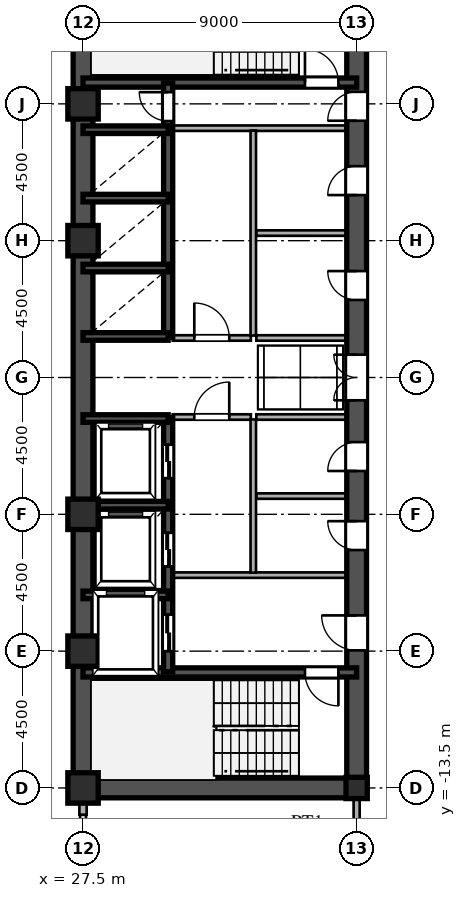
"""IFC4 building model, lengths in metres.
Left out: names, types, materials, properties, quantities, classifications, styles, units other than length and angle.
Written with IfcOpenShell. Run it as: python <this file> out.ifc"""

import sys

from ifc_helpers import new_model, si_unit, direction, frame, frame_2d, origin, origin_2d, place, context, subcontext, project, spatial, rectangle, hollow_rectangle, i_section, extrude, source, transform, mapped, element, fill, save


model = new_model("IFC4")
c1 = context("Model", 3, precision=1e-05, world=origin(), true_north=direction((0.0, 1.0)))
c2 = subcontext(c1, "Body", "Model", "MODEL_VIEW")
j1 = project(units=[si_unit("LENGTHUNIT", "METRE"), si_unit("PLANEANGLEUNIT", "RADIAN")], contexts=[c1])
p1 = place(None, origin())
s1 = spatial("IfcSite", under=j1, at=p1, CompositionType="ELEMENT")
p2 = place(p1, origin())
s2 = spatial("IfcBuilding", under=s1, at=p2, CompositionType="ELEMENT")
p3 = place(p2, frame((0.0, 0.0, 117.6)))
s3 = spatial("IfcBuildingStorey", under=s2, at=p3, CompositionType="ELEMENT", Elevation=117.6)
m1 = source(origin(), c2, "Body", "SweptSolid", [
    extrude(hollow_rectangle(XDim=1.0, YDim=1.0, WallThickness=0.042, at=origin_2d()), origin(), (0.0, 0.0, 1.0), 3.6),
])
for number, where, z_axis, x_axis in (
    (1, (27.5, -13.5, 0.0), (0.0, 0.0, 1.0), (1.0, 0.0, 0.0)),
    (2, (27.5, -9.0, 0.0), (0.0, 0.0, 1.0), (1.0, 0.0, 0.0)),
    (3, (27.5, -4.5, 0.0), (0.0, 0.0, 1.0), (1.0, 0.0, 0.0)),
    (4, (27.5, 4.5, 0.0), (0.0, 0.0, 1.0), (1.0, 0.0, 0.0)),
    (5, (27.5, 9.0, 0.0), (0.0, 0.0, 1.0), (1.0, 0.0, 0.0)),
):
    element("IfcColumn", number, at=place(p3, frame(where, z_axis=z_axis, x_axis=x_axis)), inside=s3, PredefinedType="COLUMN", context=c2, shape_type="MappedRepresentation", body=[
        mapped(m1, transform((0.0, 0.0, 0.0), scale=1.0)),
    ])
m2 = source(origin(), c2, "Body", "SweptSolid", [
    extrude(i_section(OverallWidth=0.7, OverallDepth=0.7, WebThickness=0.028, FlangeThickness=0.045, at=origin_2d()), origin(), (0.0, 0.0, 1.0), 3.6),
])
p4 = place(p3, frame((36.5, -13.5, 0.0), z_axis=(0.0, 0.0, 1.0), x_axis=(1.0, 0.0, 0.0)))
e6 = element("IfcColumn", 6, at=p4, inside=s3, PredefinedType="COLUMN", context=c2, shape_type="MappedRepresentation", body=[
    mapped(m2, transform((0.0, 0.0, 0.0), scale=1.0)),
])
p5 = place(p3, frame((27.5, -14.38, 0.0), z_axis=(0.0, 0.0, 1.0), x_axis=(0.0, 1.0, 0.0)))
e7 = element("IfcWall", 7, at=p5, inside=s3, PredefinedType="SOLIDWALL", context=c2, shape_type="SweptSolid", body=[
    extrude(rectangle(XDim=0.55, YDim=0.24, at=frame_2d((0.275, 0.0))), origin(), (0.0, 0.0, 1.0), 2.88),
])
for number, where, z_axis, x_axis in (
    (8, (27.5, -13.5, 0.0), (0.0, 0.0, 1.0), (0.0, 1.0, 0.0)),
    (9, (27.5, 1.3, 0.0), (0.0, 0.0, 1.0), (0.0, 1.0, 0.0)),
):
    element("IfcWall", number, at=place(p3, frame(where, z_axis=z_axis, x_axis=x_axis)), inside=s3, PredefinedType="SHEAR", context=c2, shape_type="SweptSolid", body=[
        extrude(rectangle(XDim=12.2, YDim=0.65, at=frame_2d((6.1, 0.0))), origin(), (0.0, 0.0, 1.0), 3.38),
    ])
p6 = place(p3, frame((27.5, -1.3, 0.0), z_axis=(0.0, 0.0, 1.0), x_axis=(0.0, 1.0, 0.0)))
e10 = element("IfcWall", 10, at=p6, inside=s3, PredefinedType="SHEAR", context=c2, shape_type="SweptSolid", body=[
    extrude(rectangle(XDim=2.6, YDim=0.65, at=frame_2d((1.3, 0.0))), origin(), (0.0, 0.0, 1.0), 3.38),
])
p7 = place(p3, frame((27.5, -13.5, 0.0), z_axis=(0.0, 0.0, 1.0), x_axis=(1.0, 0.0, 0.0)))
e11 = element("IfcWall", 11, at=p7, inside=s3, PredefinedType="SHEAR", context=c2, shape_type="SweptSolid", body=[
    extrude(rectangle(XDim=9.0, YDim=0.65, at=frame_2d((4.5, 0.0))), origin(), (0.0, 0.0, 1.0), 3.38),
])
p8 = place(p3, frame((36.5, -13.65, 0.0), z_axis=(0.0, 0.0, 1.0), x_axis=(0.0, 1.0, 0.0)))
e12 = element("IfcWall", 12, at=p8, inside=s3, PredefinedType="SHEAR", context=c2, shape_type="SweptSolid", body=[
    extrude(rectangle(XDim=7.15, YDim=0.65, at=frame_2d((3.575, 0.0))), origin(), (0.0, 0.0, 1.0), 3.38),
])
p9 = place(p8, frame((4.675, 0.0, 0.0)))
e13 = element("IfcOpeningElement", 13, at=p9, cuts=e12, PredefinedType="OPENING", context=c2, shape_type="SweptSolid", body=[
    extrude(rectangle(XDim=1.15, YDim=2.2, at=frame_2d((0.575, 1.1))), frame((0.0, 0.335, 0.0), z_axis=(0.0, -1.0, 0.0), x_axis=(1.0, 0.0, 0.0)), (0.0, 0.0, 1.0), 0.67),
])
p10 = place(p3, frame((36.5, -1.3, 0.0), z_axis=(0.0, 0.0, 1.0), x_axis=(0.0, 1.0, 0.0)))
e14 = element("IfcWall", 14, at=p10, inside=s3, PredefinedType="SHEAR", context=c2, shape_type="SweptSolid", body=[
    extrude(rectangle(XDim=2.6, YDim=0.65, at=frame_2d((1.3, 0.0))), origin(), (0.0, 0.0, 1.0), 3.38),
])
p11 = place(p10, frame((0.55, 0.0, 0.0)))
e15 = element("IfcOpeningElement", 15, at=p11, cuts=e14, PredefinedType="OPENING", context=c2, shape_type="SweptSolid", body=[
    extrude(rectangle(XDim=1.5, YDim=2.3, at=frame_2d((0.75, 1.15))), frame((0.0, 0.335, 0.0), z_axis=(0.0, -1.0, 0.0), x_axis=(1.0, 0.0, 0.0)), (0.0, 0.0, 1.0), 0.67),
])
p12 = place(p3, frame((36.5, 8.2, 0.0), z_axis=(0.0, 0.0, 1.0), x_axis=(0.0, 1.0, 0.0)))
e16 = element("IfcWall", 16, at=p12, inside=s3, PredefinedType="SHEAR", context=c2, shape_type="SweptSolid", body=[
    extrude(rectangle(XDim=5.45, YDim=0.65, at=frame_2d((2.725, 0.0))), origin(), (0.0, 0.0, 1.0), 3.38),
])
p13 = place(p12, frame((0.245, 0.0, 0.0)))
e17 = element("IfcOpeningElement", 17, at=p13, cuts=e16, PredefinedType="OPENING", context=c2, shape_type="SweptSolid", body=[
    extrude(rectangle(XDim=0.95, YDim=2.15, at=frame_2d((0.475, 1.075))), frame((0.0, 0.335, 0.0), z_axis=(0.0, -1.0, 0.0), x_axis=(1.0, 0.0, 0.0)), (0.0, 0.0, 1.0), 0.67),
])
p14 = place(p3, frame((36.5, -6.5, 0.0), z_axis=(0.0, 0.0, 1.0), x_axis=(0.0, 1.0, 0.0)))
e18 = element("IfcWall", 18, at=p14, inside=s3, PredefinedType="SHEAR", context=c2, shape_type="SweptSolid", body=[
    extrude(rectangle(XDim=2.6, YDim=0.65, at=frame_2d((1.3, 0.0))), origin(), (0.0, 0.0, 1.0), 3.38),
])
p15 = place(p14, frame((0.825, 0.0, 0.0)))
e19 = element("IfcOpeningElement", 19, at=p15, cuts=e18, PredefinedType="OPENING", context=c2, shape_type="SweptSolid", body=[
    extrude(rectangle(XDim=0.95, YDim=2.15, at=frame_2d((0.475, 1.075))), frame((0.0, 0.335, 0.0), z_axis=(0.0, -1.0, 0.0), x_axis=(1.0, 0.0, 0.0)), (0.0, 0.0, 1.0), 0.67),
])
p16 = place(p3, frame((36.5, -3.9, 0.0), z_axis=(0.0, 0.0, 1.0), x_axis=(0.0, 1.0, 0.0)))
e20 = element("IfcWall", 20, at=p16, inside=s3, PredefinedType="SHEAR", context=c2, shape_type="SweptSolid", body=[
    extrude(rectangle(XDim=2.6, YDim=0.65, at=frame_2d((1.3, 0.0))), origin(), (0.0, 0.0, 1.0), 3.38),
])
p17 = place(p16, frame((0.825, 0.0, 0.0)))
e21 = element("IfcOpeningElement", 21, at=p17, cuts=e20, PredefinedType="OPENING", context=c2, shape_type="SweptSolid", body=[
    extrude(rectangle(XDim=0.95, YDim=2.15, at=frame_2d((0.475, 1.075))), frame((0.0, 0.335, 0.0), z_axis=(0.0, -1.0, 0.0), x_axis=(1.0, 0.0, 0.0)), (0.0, 0.0, 1.0), 0.67),
])
p18 = place(p3, frame((36.5, 1.3, 0.0), z_axis=(0.0, 0.0, 1.0), x_axis=(0.0, 1.0, 0.0)))
e22 = element("IfcWall", 22, at=p18, inside=s3, PredefinedType="SHEAR", context=c2, shape_type="SweptSolid", body=[
    extrude(rectangle(XDim=3.45, YDim=0.65, at=frame_2d((1.725, 0.0))), origin(), (0.0, 0.0, 1.0), 3.38),
])
p19 = place(p18, frame((1.25, 0.0, 0.0)))
e23 = element("IfcOpeningElement", 23, at=p19, cuts=e22, PredefinedType="OPENING", context=c2, shape_type="SweptSolid", body=[
    extrude(rectangle(XDim=0.95, YDim=2.15, at=frame_2d((0.475, 1.075))), frame((0.0, 0.335, 0.0), z_axis=(0.0, -1.0, 0.0), x_axis=(1.0, 0.0, 0.0)), (0.0, 0.0, 1.0), 0.67),
])
p20 = place(p3, frame((36.5, 4.75, 0.0), z_axis=(0.0, 0.0, 1.0), x_axis=(0.0, 1.0, 0.0)))
e24 = element("IfcWall", 24, at=p20, inside=s3, PredefinedType="SHEAR", context=c2, shape_type="SweptSolid", body=[
    extrude(rectangle(XDim=3.45, YDim=0.65, at=frame_2d((1.725, 0.0))), origin(), (0.0, 0.0, 1.0), 3.38),
])
p21 = place(p20, frame((1.25, 0.0, 0.0)))
e25 = element("IfcOpeningElement", 25, at=p21, cuts=e24, PredefinedType="OPENING", context=c2, shape_type="SweptSolid", body=[
    extrude(rectangle(XDim=0.95, YDim=2.15, at=frame_2d((0.475, 1.075))), frame((0.0, 0.335, 0.0), z_axis=(0.0, -1.0, 0.0), x_axis=(1.0, 0.0, 0.0)), (0.0, 0.0, 1.0), 0.67),
])
p22 = place(p3, frame((27.5, -9.7, 0.0), z_axis=(0.0, 0.0, 1.0), x_axis=(1.0, 0.0, 0.0)))
e26 = element("IfcWall", 26, at=p22, inside=s3, PredefinedType="SHEAR", context=c2, shape_type="SweptSolid", body=[
    extrude(rectangle(XDim=9.0, YDim=0.3, at=frame_2d((4.5, 0.0))), origin(), (0.0, 0.0, 1.0), 3.38),
])
p23 = place(p22, frame((7.3, 0.0, 0.0)))
e27 = element("IfcOpeningElement", 27, at=p23, cuts=e26, PredefinedType="OPENING", context=c2, shape_type="SweptSolid", body=[
    extrude(rectangle(XDim=1.1, YDim=2.2, at=frame_2d((0.55, 1.1))), frame((0.0, 0.16, 0.0), z_axis=(0.0, -1.0, 0.0), x_axis=(1.0, 0.0, 0.0)), (0.0, 0.0, 1.0), 0.32),
])
p24 = place(p3, frame((27.5, 9.7, 0.0), z_axis=(0.0, 0.0, 1.0), x_axis=(1.0, 0.0, 0.0)))
e28 = element("IfcWall", 28, at=p24, inside=s3, PredefinedType="SHEAR", context=c2, shape_type="SweptSolid", body=[
    extrude(rectangle(XDim=9.0, YDim=0.3, at=frame_2d((4.5, 0.0))), origin(), (0.0, 0.0, 1.0), 3.38),
])
p25 = place(p24, frame((7.3, 0.0, 0.0)))
e29 = element("IfcOpeningElement", 29, at=p25, cuts=e28, PredefinedType="OPENING", context=c2, shape_type="SweptSolid", body=[
    extrude(rectangle(XDim=1.1, YDim=2.2, at=frame_2d((0.55, 1.1))), frame((0.0, 0.16, 0.0), z_axis=(0.0, -1.0, 0.0), x_axis=(1.0, 0.0, 0.0)), (0.0, 0.0, 1.0), 0.32),
])
for number, where, z_axis, x_axis in (
    (30, (27.5, -7.15, 0.0), (0.0, 0.0, 1.0), (1.0, 0.0, 0.0)),
    (31, (27.5, -4.2, 0.0), (0.0, 0.0, 1.0), (1.0, 0.0, 0.0)),
    (32, (27.5, -1.35, 0.0), (0.0, 0.0, 1.0), (1.0, 0.0, 0.0)),
    (33, (27.5, 1.35, 0.0), (0.0, 0.0, 1.0), (1.0, 0.0, 0.0)),
    (34, (27.5, 3.6, 0.0), (0.0, 0.0, 1.0), (1.0, 0.0, 0.0)),
    (35, (27.5, 5.9, 0.0), (0.0, 0.0, 1.0), (1.0, 0.0, 0.0)),
    (36, (27.5, 8.15, 0.0), (0.0, 0.0, 1.0), (1.0, 0.0, 0.0)),
):
    element("IfcWall", number, at=place(p3, frame(where, z_axis=z_axis, x_axis=x_axis)), inside=s3, PredefinedType="SHEAR", context=c2, shape_type="SweptSolid", body=[
        extrude(rectangle(XDim=2.8, YDim=0.25, at=frame_2d((1.4, 0.0))), origin(), (0.0, 0.0, 1.0), 3.38),
    ])
p26 = place(p3, frame((30.3, -9.68, 0.0), z_axis=(0.0, 0.0, 1.0), x_axis=(0.0, 1.0, 0.0)))
e37 = element("IfcWall", 37, at=p26, inside=s3, PredefinedType="SHEAR", context=c2, shape_type="SweptSolid", body=[
    extrude(rectangle(XDim=2.56, YDim=0.3, at=frame_2d((1.28, 0.0))), origin(), (0.0, 0.0, 1.0), 3.38),
])
p27 = place(p26, frame((0.68, 0.0, 0.0)))
e38 = element("IfcOpeningElement", 38, at=p27, cuts=e37, PredefinedType="OPENING", context=c2, shape_type="SweptSolid", body=[
    extrude(rectangle(XDim=1.2, YDim=2.25, at=frame_2d((0.6, 1.125))), frame((0.0, 0.16, 0.0), z_axis=(0.0, -1.0, 0.0), x_axis=(1.0, 0.0, 0.0)), (0.0, 0.0, 1.0), 0.32),
])
p28 = place(p3, frame((30.3, -7.12, 0.0), z_axis=(0.0, 0.0, 1.0), x_axis=(0.0, 1.0, 0.0)))
e39 = element("IfcWall", 39, at=p28, inside=s3, PredefinedType="SHEAR", context=c2, shape_type="SweptSolid", body=[
    extrude(rectangle(XDim=2.92, YDim=0.3, at=frame_2d((1.46, 0.0))), origin(), (0.0, 0.0, 1.0), 3.38),
])
p29 = place(p28, frame((0.91, 0.0, 0.0)))
e40 = element("IfcOpeningElement", 40, at=p29, cuts=e39, PredefinedType="OPENING", context=c2, shape_type="SweptSolid", body=[
    extrude(rectangle(XDim=1.1, YDim=2.2, at=frame_2d((0.55, 1.1))), frame((0.0, 0.16, 0.0), z_axis=(0.0, -1.0, 0.0), x_axis=(1.0, 0.0, 0.0)), (0.0, 0.0, 1.0), 0.32),
])
p30 = place(p3, frame((30.3, -4.2, 0.0), z_axis=(0.0, 0.0, 1.0), x_axis=(0.0, 1.0, 0.0)))
e41 = element("IfcWall", 41, at=p30, inside=s3, PredefinedType="SHEAR", context=c2, shape_type="SweptSolid", body=[
    extrude(rectangle(XDim=2.88, YDim=0.3, at=frame_2d((1.44, 0.0))), origin(), (0.0, 0.0, 1.0), 3.38),
])
p31 = place(p30, frame((0.89, 0.0, 0.0)))
e42 = element("IfcOpeningElement", 42, at=p31, cuts=e41, PredefinedType="OPENING", context=c2, shape_type="SweptSolid", body=[
    extrude(rectangle(XDim=1.1, YDim=2.2, at=frame_2d((0.55, 1.1))), frame((0.0, 0.16, 0.0), z_axis=(0.0, -1.0, 0.0), x_axis=(1.0, 0.0, 0.0)), (0.0, 0.0, 1.0), 0.32),
])
p32 = place(p3, frame((30.3, 1.32, 0.0), z_axis=(0.0, 0.0, 1.0), x_axis=(0.0, 1.0, 0.0)))
e43 = element("IfcWall", 43, at=p32, inside=s3, PredefinedType="SHEAR", context=c2, shape_type="SweptSolid", body=[
    extrude(rectangle(XDim=2.28, YDim=0.3, at=frame_2d((1.14, 0.0))), origin(), (0.0, 0.0, 1.0), 3.38),
])
p33 = place(p3, frame((30.3, 3.6, 0.0), z_axis=(0.0, 0.0, 1.0), x_axis=(0.0, 1.0, 0.0)))
e44 = element("IfcWall", 44, at=p33, inside=s3, PredefinedType="SHEAR", context=c2, shape_type="SweptSolid", body=[
    extrude(rectangle(XDim=2.3, YDim=0.3, at=frame_2d((1.15, 0.0))), origin(), (0.0, 0.0, 1.0), 3.38),
])
p34 = place(p3, frame((30.3, 5.9, 0.0), z_axis=(0.0, 0.0, 1.0), x_axis=(0.0, 1.0, 0.0)))
e45 = element("IfcWall", 45, at=p34, inside=s3, PredefinedType="SHEAR", context=c2, shape_type="SweptSolid", body=[
    extrude(rectangle(XDim=2.25, YDim=0.3, at=frame_2d((1.125, 0.0))), origin(), (0.0, 0.0, 1.0), 3.38),
])
p35 = place(p3, frame((30.3, 8.15, 0.0), z_axis=(0.0, 0.0, 1.0), x_axis=(0.0, 1.0, 0.0)))
e46 = element("IfcWall", 46, at=p35, inside=s3, PredefinedType="SHEAR", context=c2, shape_type="SweptSolid", body=[
    extrude(rectangle(XDim=1.53, YDim=0.3, at=frame_2d((0.765, 0.0))), origin(), (0.0, 0.0, 1.0), 3.38),
])
p36 = place(p35, frame((0.285, 0.0, 0.0)))
e47 = element("IfcOpeningElement", 47, at=p36, cuts=e46, PredefinedType="OPENING", context=c2, shape_type="SweptSolid", body=[
    extrude(rectangle(XDim=0.95, YDim=2.15, at=frame_2d((0.475, 1.075))), frame((0.0, 0.16, 0.0), z_axis=(0.0, -1.0, 0.0), x_axis=(1.0, 0.0, 0.0)), (0.0, 0.0, 1.0), 0.32),
])
for number, where, z_axis, x_axis in (
    (48, (30.45, -6.5, 0.0), (0.0, 0.0, 1.0), (1.0, 0.0, 0.0)),
    (49, (30.45, 8.2, 0.0), (0.0, 0.0, 1.0), (1.0, 0.0, 0.0)),
):
    element("IfcWall", number, at=place(p3, frame(where, z_axis=z_axis, x_axis=x_axis)), inside=s3, PredefinedType="PARTITIONING", context=c2, shape_type="SweptSolid", body=[
        extrude(rectangle(XDim=5.7, YDim=0.18, at=frame_2d((2.85, 0.0))), origin(), (0.0, 0.0, 1.0), 3.38),
    ])
p37 = place(p3, frame((33.1, -6.42, 0.0), z_axis=(0.0, 0.0, 1.0), x_axis=(0.0, 1.0, 0.0)))
e50 = element("IfcWall", 50, at=p37, inside=s3, PredefinedType="PARTITIONING", context=c2, shape_type="SweptSolid", body=[
    extrude(rectangle(XDim=5.04, YDim=0.18, at=frame_2d((2.52, 0.0))), origin(), (0.0, 0.0, 1.0), 3.38),
])
p38 = place(p3, frame((33.1, 1.38, 0.0), z_axis=(0.0, 0.0, 1.0), x_axis=(0.0, 1.0, 0.0)))
e51 = element("IfcWall", 51, at=p38, inside=s3, PredefinedType="PARTITIONING", context=c2, shape_type="SweptSolid", body=[
    extrude(rectangle(XDim=6.74, YDim=0.18, at=frame_2d((3.37, 0.0))), origin(), (0.0, 0.0, 1.0), 3.38),
])
p39 = place(p3, frame((30.45, -1.3, 0.0), z_axis=(0.0, 0.0, 1.0), x_axis=(1.0, 0.0, 0.0)))
e52 = element("IfcWall", 52, at=p39, inside=s3, PredefinedType="PARTITIONING", context=c2, shape_type="SweptSolid", body=[
    extrude(rectangle(XDim=2.57, YDim=0.18, at=frame_2d((1.285, 0.0))), origin(), (0.0, 0.0, 1.0), 3.38),
])
p40 = place(p39, frame((0.71, 0.0, 0.0)))
e53 = element("IfcOpeningElement", 53, at=p40, cuts=e52, PredefinedType="OPENING", context=c2, shape_type="SweptSolid", body=[
    extrude(rectangle(XDim=1.15, YDim=2.2, at=frame_2d((0.575, 1.1))), frame((0.0, 0.1, 0.0), z_axis=(0.0, -1.0, 0.0), x_axis=(1.0, 0.0, 0.0)), (0.0, 0.0, 1.0), 0.2),
])
p41 = place(p3, frame((30.45, 1.3, 0.0), z_axis=(0.0, 0.0, 1.0), x_axis=(1.0, 0.0, 0.0)))
e54 = element("IfcWall", 54, at=p41, inside=s3, PredefinedType="PARTITIONING", context=c2, shape_type="SweptSolid", body=[
    extrude(rectangle(XDim=2.57, YDim=0.18, at=frame_2d((1.285, 0.0))), origin(), (0.0, 0.0, 1.0), 3.38),
])
p42 = place(p41, frame((0.71, 0.0, 0.0)))
e55 = element("IfcOpeningElement", 55, at=p42, cuts=e54, PredefinedType="OPENING", context=c2, shape_type="SweptSolid", body=[
    extrude(rectangle(XDim=1.15, YDim=2.2, at=frame_2d((0.575, 1.1))), frame((0.0, 0.1, 0.0), z_axis=(0.0, -1.0, 0.0), x_axis=(1.0, 0.0, 0.0)), (0.0, 0.0, 1.0), 0.2),
])
for number, where, z_axis, x_axis in (
    (56, (33.2, -1.3, 0.0), (0.0, 0.0, 1.0), (1.0, 0.0, 0.0)),
    (57, (33.2, 1.3, 0.0), (0.0, 0.0, 1.0), (1.0, 0.0, 0.0)),
    (58, (33.2, -3.9, 0.0), (0.0, 0.0, 1.0), (1.0, 0.0, 0.0)),
    (59, (33.2, 4.75, 0.0), (0.0, 0.0, 1.0), (1.0, 0.0, 0.0)),
):
    element("IfcWall", number, at=place(p3, frame(where, z_axis=z_axis, x_axis=x_axis)), inside=s3, PredefinedType="PARTITIONING", context=c2, shape_type="SweptSolid", body=[
        extrude(rectangle(XDim=2.95, YDim=0.18, at=frame_2d((1.475, 0.0))), origin(), (0.0, 0.0, 1.0), 3.38),
    ])
p43 = place(p3, frame((36.5, -15.515, 0.0), z_axis=(0.0, 0.0, 1.0), x_axis=(0.0, 1.0, 0.0)))
e60 = element("IfcWall", 60, at=p43, inside=s3, PredefinedType="PARTITIONING", context=c2, shape_type="SweptSolid", body=[
    extrude(rectangle(XDim=1.685, YDim=0.2, at=frame_2d((0.842, 0.0))), origin(), (0.0, 0.0, 1.0), 2.78),
])
m3 = source(origin(), c2, "Body", "SweptSolid", [
    extrude(rectangle(XDim=1.15, YDim=2.2, at=frame_2d((0.575, 1.1))), frame((0.0, 0.025, 0.0), z_axis=(0.0, -1.0, 0.0), x_axis=(1.0, 0.0, 0.0)), (0.0, 0.0, 1.0), 0.05),
])
p44 = place(p9, origin())
e61 = element("IfcDoor", 61, at=p44, inside=s3, OperationType="SINGLE_SWING_RIGHT", PredefinedType="DOOR", context=c2, shape_type="MappedRepresentation", body=[
    mapped(m3, transform((0.0, 0.0, 0.0), scale=1.0)),
])
fill(e13, e61)
m4 = source(origin(), c2, "Body", "SweptSolid", [
    extrude(rectangle(XDim=1.5, YDim=2.3, at=frame_2d((0.75, 1.15))), frame((0.0, 0.025, 0.0), z_axis=(0.0, -1.0, 0.0), x_axis=(1.0, 0.0, 0.0)), (0.0, 0.0, 1.0), 0.05),
])
p45 = place(p11, origin())
e62 = element("IfcDoor", 62, at=p45, inside=s3, OperationType="DOUBLE_SWING_LEFT", PredefinedType="DOOR", context=c2, shape_type="MappedRepresentation", body=[
    mapped(m4, transform((0.0, 0.0, 0.0), scale=1.0)),
])
fill(e15, e62)
m5 = source(origin(), c2, "Body", "SweptSolid", [
    extrude(rectangle(XDim=0.95, YDim=2.15, at=frame_2d((0.475, 1.075))), frame((0.0, 0.025, 0.0), z_axis=(0.0, -1.0, 0.0), x_axis=(1.0, 0.0, 0.0)), (0.0, 0.0, 1.0), 0.05),
])
p46 = place(p13, origin())
e63 = element("IfcDoor", 63, at=p46, inside=s3, OperationType="SINGLE_SWING_LEFT", PredefinedType="DOOR", context=c2, shape_type="MappedRepresentation", body=[
    mapped(m5, transform((0.0, 0.0, 0.0), scale=1.0)),
])
fill(e17, e63)
p47 = place(p15, origin())
e64 = element("IfcDoor", 64, at=p47, inside=s3, OperationType="SINGLE_SWING_RIGHT", PredefinedType="DOOR", context=c2, shape_type="MappedRepresentation", body=[
    mapped(m5, transform((0.0, 0.0, 0.0), scale=1.0)),
])
fill(e19, e64)
p48 = place(p17, origin())
e65 = element("IfcDoor", 65, at=p48, inside=s3, OperationType="SINGLE_SWING_LEFT", PredefinedType="DOOR", context=c2, shape_type="MappedRepresentation", body=[
    mapped(m5, transform((0.0, 0.0, 0.0), scale=1.0)),
])
fill(e21, e65)
p49 = place(p19, origin())
e66 = element("IfcDoor", 66, at=p49, inside=s3, OperationType="SINGLE_SWING_RIGHT", PredefinedType="DOOR", context=c2, shape_type="MappedRepresentation", body=[
    mapped(m5, transform((0.0, 0.0, 0.0), scale=1.0)),
])
fill(e23, e66)
p50 = place(p21, origin())
e67 = element("IfcDoor", 67, at=p50, inside=s3, OperationType="SINGLE_SWING_LEFT", PredefinedType="DOOR", context=c2, shape_type="MappedRepresentation", body=[
    mapped(m5, transform((0.0, 0.0, 0.0), scale=1.0)),
])
fill(e25, e67)
m6 = source(origin(), c2, "Body", "SweptSolid", [
    extrude(rectangle(XDim=1.1, YDim=2.2, at=frame_2d((0.55, 1.1))), frame((0.0, 0.025, 0.0), z_axis=(0.0, -1.0, 0.0), x_axis=(1.0, 0.0, 0.0)), (0.0, 0.0, 1.0), 0.05),
])
p51 = place(p23, frame((1.1, 0.0, 0.0), z_axis=(0.0, 0.0, 1.0), x_axis=(-1.0, 0.0, 0.0)))
e68 = element("IfcDoor", 68, at=p51, inside=s3, OperationType="SINGLE_SWING_RIGHT", PredefinedType="DOOR", context=c2, shape_type="MappedRepresentation", body=[
    mapped(m6, transform((0.0, 0.0, 0.0), scale=1.0)),
])
fill(e27, e68)
p52 = place(p25, origin())
e69 = element("IfcDoor", 69, at=p52, inside=s3, OperationType="SINGLE_SWING_LEFT", PredefinedType="DOOR", context=c2, shape_type="MappedRepresentation", body=[
    mapped(m6, transform((0.0, 0.0, 0.0), scale=1.0)),
])
fill(e29, e69)
m7 = source(origin(), c2, "Body", "SweptSolid", [
    extrude(rectangle(XDim=1.2, YDim=2.25, at=frame_2d((0.6, 1.125))), frame((0.0, 0.025, 0.0), z_axis=(0.0, -1.0, 0.0), x_axis=(1.0, 0.0, 0.0)), (0.0, 0.0, 1.0), 0.05),
])
p53 = place(p27, origin())
e70 = element("IfcDoor", 70, at=p53, inside=s3, OperationType="DOUBLE_DOOR_SLIDING", PredefinedType="DOOR", context=c2, shape_type="MappedRepresentation", body=[
    mapped(m7, transform((0.0, 0.0, 0.0), scale=1.0)),
])
fill(e38, e70)
m8 = source(origin(), c2, "Body", "SweptSolid", [
    extrude(rectangle(XDim=1.1, YDim=2.2, at=frame_2d((0.55, 1.1))), frame((0.0, 0.025, 0.0), z_axis=(0.0, -1.0, 0.0), x_axis=(1.0, 0.0, 0.0)), (0.0, 0.0, 1.0), 0.05),
])
p54 = place(p29, origin())
e71 = element("IfcDoor", 71, at=p54, inside=s3, OperationType="DOUBLE_DOOR_SLIDING", PredefinedType="DOOR", context=c2, shape_type="MappedRepresentation", body=[
    mapped(m8, transform((0.0, 0.0, 0.0), scale=1.0)),
])
fill(e40, e71)
p55 = place(p31, origin())
e72 = element("IfcDoor", 72, at=p55, inside=s3, OperationType="DOUBLE_DOOR_SLIDING", PredefinedType="DOOR", context=c2, shape_type="MappedRepresentation", body=[
    mapped(m8, transform((0.0, 0.0, 0.0), scale=1.0)),
])
fill(e42, e72)
p56 = place(p36, origin())
e73 = element("IfcDoor", 73, at=p56, inside=s3, OperationType="SINGLE_SWING_RIGHT", PredefinedType="DOOR", context=c2, shape_type="MappedRepresentation", body=[
    mapped(m5, transform((0.0, 0.0, 0.0), scale=1.0)),
])
fill(e47, e73)
p57 = place(p40, origin())
e74 = element("IfcDoor", 74, at=p57, inside=s3, OperationType="SINGLE_SWING_RIGHT", PredefinedType="DOOR", context=c2, shape_type="MappedRepresentation", body=[
    mapped(m3, transform((0.0, 0.0, 0.0), scale=1.0)),
])
fill(e53, e74)
p58 = place(p42, origin())
e75 = element("IfcDoor", 75, at=p58, inside=s3, OperationType="SINGLE_SWING_LEFT", PredefinedType="DOOR", context=c2, shape_type="MappedRepresentation", body=[
    mapped(m3, transform((0.0, 0.0, 0.0), scale=1.0)),
])
fill(e55, e75)
save(model, sys.argv[1])
